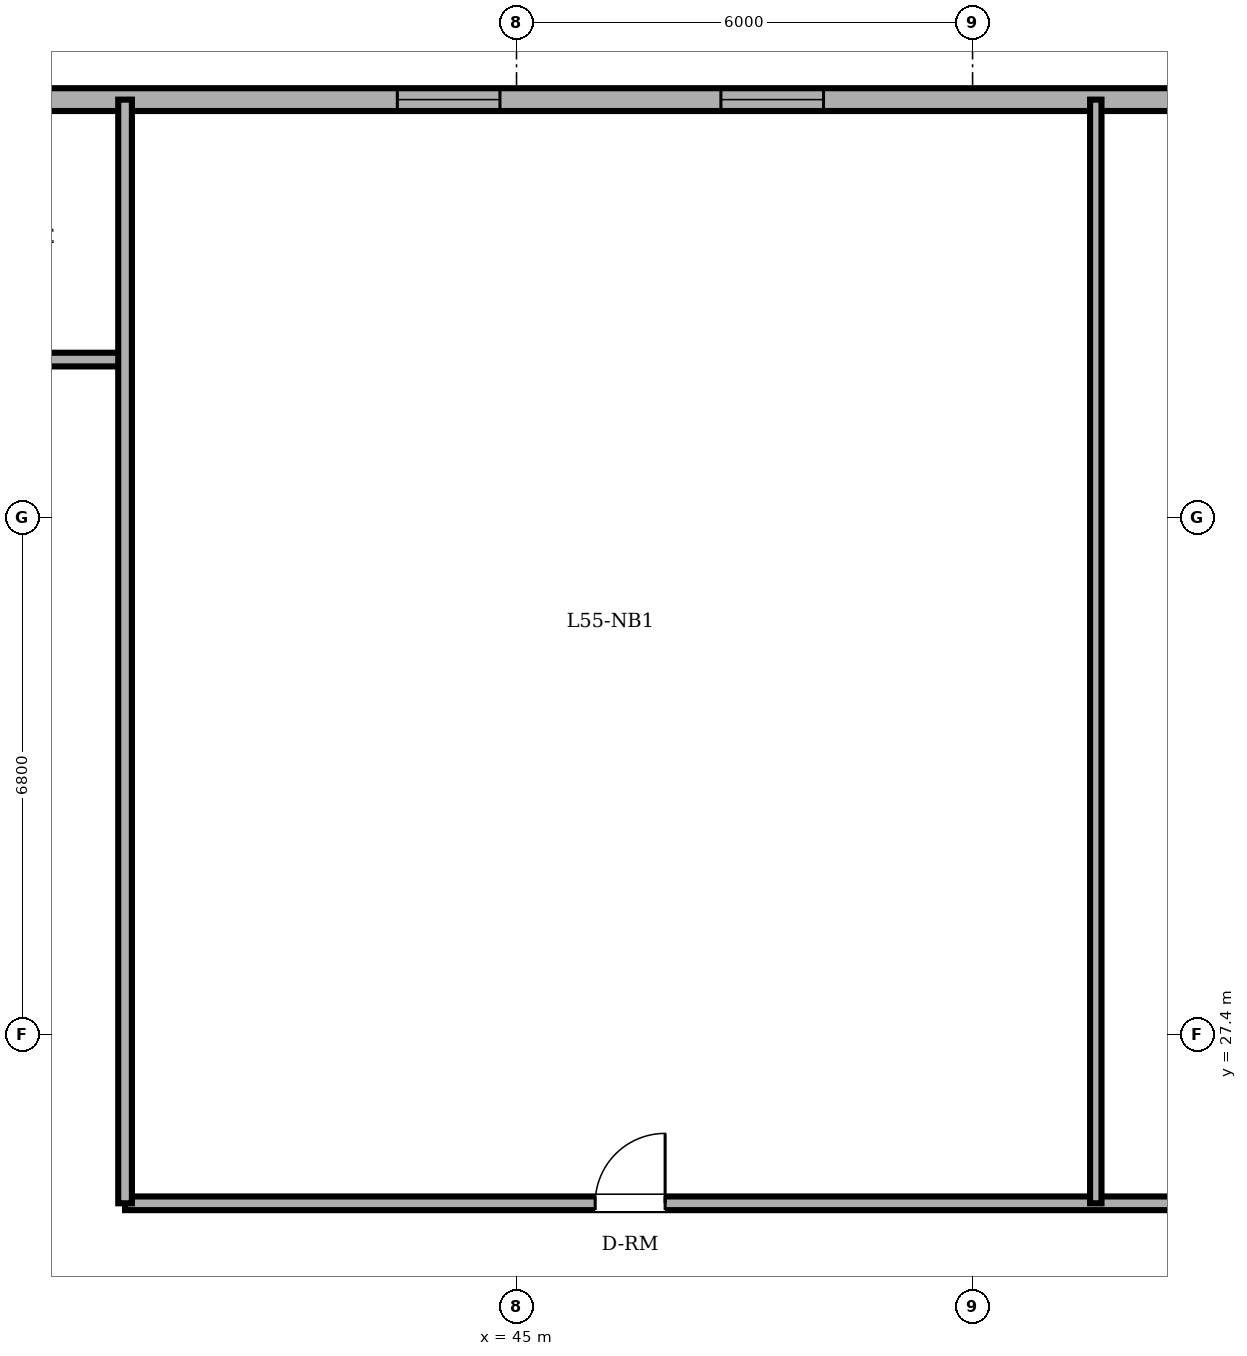
"""IFC4 building model, lengths in metres.
Left out: names, types, materials, properties, quantities, classifications, styles, units other than length and angle.
Written with IfcOpenShell. Run it as: python <this file> out.ifc"""

import sys

from ifc_helpers import new_model, si_unit, direction, frame, frame_2d, origin, place, context, subcontext, project, spatial, rectangle, extrude, element, fill, save


model = new_model("IFC4")
c1 = context("Model", 3, precision=1e-05, world=origin(), true_north=direction((0.0, 1.0)))
c2 = subcontext(c1, "Body", "Model", "MODEL_VIEW")
j1 = project(units=[si_unit("LENGTHUNIT", "METRE"), si_unit("PLANEANGLEUNIT", "RADIAN")], contexts=[c1])
p1 = place(None, origin())
s1 = spatial("IfcSite", under=j1, at=p1, CompositionType="ELEMENT")
p2 = place(p1, origin())
s2 = spatial("IfcBuilding", under=s1, at=p2, CompositionType="ELEMENT")
p3 = place(p2, frame((0.0, 0.0, 212.1)))
s3 = spatial("IfcBuildingStorey", under=s2, at=p3, CompositionType="ELEMENT", Elevation=212.1)
p4 = place(p3, frame((54.885, 39.7, 0.0), z_axis=(0.0, 0.0, 1.0), x_axis=(-1.0, 0.0, 0.0)))
e1 = element("IfcWall", 1, at=p4, inside=s3, PredefinedType="SOLIDWALL", context=c2, shape_type="SweptSolid", body=[
    extrude(rectangle(XDim=32.485, YDim=0.3, at=frame_2d((16.243, 0.0))), origin(), (0.0, 0.0, 1.0), 3.4),
])
p5 = place(p4, frame((19.21, 0.0, 0.0)))
e2 = element("IfcOpeningElement", 2, at=p5, cuts=e1, PredefinedType="OPENING", context=c2, shape_type="SweptSolid", body=[
    extrude(rectangle(XDim=0.95, YDim=2.2, at=frame_2d((0.475, 1.1))), frame((0.0, 0.16, 0.0), z_axis=(0.0, -1.0, 0.0), x_axis=(1.0, 0.0, 0.0)), (0.0, 0.0, 1.0), 0.32),
])
p6 = place(p4, frame((5.846, 0.0, 0.85)))
e3 = element("IfcOpeningElement", 3, at=p6, cuts=e1, PredefinedType="OPENING", context=c2, shape_type="SweptSolid", body=[
    extrude(rectangle(XDim=1.35, YDim=1.55, at=frame_2d((0.675, 0.775))), frame((0.0, 0.16, 0.0), z_axis=(0.0, -1.0, 0.0), x_axis=(1.0, 0.0, 0.0)), (0.0, 0.0, 1.0), 0.32),
])
p7 = place(p4, frame((10.103, 0.0, 0.85)))
e4 = element("IfcOpeningElement", 4, at=p7, cuts=e1, PredefinedType="OPENING", context=c2, shape_type="SweptSolid", body=[
    extrude(rectangle(XDim=1.35, YDim=1.55, at=frame_2d((0.675, 0.775))), frame((0.0, 0.16, 0.0), z_axis=(0.0, -1.0, 0.0), x_axis=(1.0, 0.0, 0.0)), (0.0, 0.0, 1.0), 0.32),
])
p8 = place(p4, frame((16.577, 0.0, 0.85)))
e5 = element("IfcOpeningElement", 5, at=p8, cuts=e1, PredefinedType="OPENING", context=c2, shape_type="SweptSolid", body=[
    extrude(rectangle(XDim=1.35, YDim=1.55, at=frame_2d((0.675, 0.775))), frame((0.0, 0.16, 0.0), z_axis=(0.0, -1.0, 0.0), x_axis=(1.0, 0.0, 0.0)), (0.0, 0.0, 1.0), 0.32),
])
p9 = place(p4, frame((22.91, 0.0, 0.85)))
e6 = element("IfcOpeningElement", 6, at=p9, cuts=e1, PredefinedType="OPENING", context=c2, shape_type="SweptSolid", body=[
    extrude(rectangle(XDim=1.35, YDim=1.55, at=frame_2d((0.675, 0.775))), frame((0.0, 0.16, 0.0), z_axis=(0.0, -1.0, 0.0), x_axis=(1.0, 0.0, 0.0)), (0.0, 0.0, 1.0), 0.32),
])
p10 = place(p4, frame((26.51, 0.0, 0.85)))
e7 = element("IfcOpeningElement", 7, at=p10, cuts=e1, PredefinedType="OPENING", context=c2, shape_type="SweptSolid", body=[
    extrude(rectangle(XDim=1.35, YDim=1.55, at=frame_2d((0.675, 0.775))), frame((0.0, 0.16, 0.0), z_axis=(0.0, -1.0, 0.0), x_axis=(1.0, 0.0, 0.0)), (0.0, 0.0, 1.0), 0.32),
])
p11 = place(p4, frame((29.835, 0.0, 0.85)))
e8 = element("IfcOpeningElement", 8, at=p11, cuts=e1, PredefinedType="OPENING", context=c2, shape_type="SweptSolid", body=[
    extrude(rectangle(XDim=1.35, YDim=1.55, at=frame_2d((0.675, 0.775))), frame((0.0, 0.16, 0.0), z_axis=(0.0, -1.0, 0.0), x_axis=(1.0, 0.0, 0.0)), (0.0, 0.0, 1.0), 0.32),
])
p12 = place(p3, frame((39.85, 25.18, 0.0), z_axis=(0.0, 0.0, 1.0), x_axis=(1.0, 0.0, 0.0)))
e9 = element("IfcWall", 9, at=p12, inside=s3, PredefinedType="PARTITIONING", context=c2, shape_type="SweptSolid", body=[
    extrude(rectangle(XDim=28.75, YDim=0.18, at=frame_2d((14.375, 0.0))), origin(), (0.0, 0.0, 1.0), 3.4),
])
p13 = place(p12, frame((6.185, 0.0, 0.0)))
e10 = element("IfcOpeningElement", 10, at=p13, cuts=e9, PredefinedType="OPENING", context=c2, shape_type="SweptSolid", body=[
    extrude(rectangle(XDim=0.92, YDim=2.1, at=frame_2d((0.46, 1.05))), frame((0.0, 0.1, 0.0), z_axis=(0.0, -1.0, 0.0), x_axis=(1.0, 0.0, 0.0)), (0.0, 0.0, 1.0), 0.2),
])
p14 = place(p12, frame((15.601, 0.0, 0.0)))
e11 = element("IfcOpeningElement", 11, at=p14, cuts=e9, PredefinedType="OPENING", context=c2, shape_type="SweptSolid", body=[
    extrude(rectangle(XDim=0.92, YDim=2.1, at=frame_2d((0.46, 1.05))), frame((0.0, 0.1, 0.0), z_axis=(0.0, -1.0, 0.0), x_axis=(1.0, 0.0, 0.0)), (0.0, 0.0, 1.0), 0.2),
])
p15 = place(p12, frame((21.15, 0.0, 0.0)))
e12 = element("IfcOpeningElement", 12, at=p15, cuts=e9, PredefinedType="OPENING", context=c2, shape_type="SweptSolid", body=[
    extrude(rectangle(XDim=1.0, YDim=2.15, at=frame_2d((0.5, 1.075))), frame((0.0, 0.1, 0.0), z_axis=(0.0, -1.0, 0.0), x_axis=(1.0, 0.0, 0.0)), (0.0, 0.0, 1.0), 0.2),
])
p16 = place(p3, frame((17.677, 36.28, 0.0), z_axis=(0.0, 0.0, 1.0), x_axis=(1.0, 0.0, 0.0)))
e13 = element("IfcWall", 13, at=p16, inside=s3, PredefinedType="PARTITIONING", context=c2, shape_type="SweptSolid", body=[
    extrude(rectangle(XDim=22.173, YDim=0.18, at=frame_2d((11.086, 0.0))), origin(), (0.0, 0.0, 1.0), 3.4),
])
p17 = place(p16, frame((9.573, 0.0, 0.0)))
e14 = element("IfcOpeningElement", 14, at=p17, cuts=e13, PredefinedType="OPENING", context=c2, shape_type="SweptSolid", body=[
    extrude(rectangle(XDim=0.9, YDim=2.1, at=frame_2d((0.45, 1.05))), frame((0.0, 0.1, 0.0), z_axis=(0.0, -1.0, 0.0), x_axis=(1.0, 0.0, 0.0)), (0.0, 0.0, 1.0), 0.2),
])
p18 = place(p16, frame((13.193, 0.0, 0.0)))
e15 = element("IfcOpeningElement", 15, at=p18, cuts=e13, PredefinedType="OPENING", context=c2, shape_type="SweptSolid", body=[
    extrude(rectangle(XDim=0.86, YDim=2.1, at=frame_2d((0.43, 1.05))), frame((0.0, 0.1, 0.0), z_axis=(0.0, -1.0, 0.0), x_axis=(1.0, 0.0, 0.0)), (0.0, 0.0, 1.0), 0.2),
])
p19 = place(p16, frame((4.063, 0.0, 0.0)))
e16 = element("IfcOpeningElement", 16, at=p19, cuts=e13, PredefinedType="OPENING", context=c2, shape_type="SweptSolid", body=[
    extrude(rectangle(XDim=0.92, YDim=2.1, at=frame_2d((0.46, 1.05))), frame((0.0, 0.1, 0.0), z_axis=(0.0, -1.0, 0.0), x_axis=(1.0, 0.0, 0.0)), (0.0, 0.0, 1.0), 0.2),
])
p20 = place(p16, frame((18.128, 0.0, 0.0)))
e17 = element("IfcOpeningElement", 17, at=p20, cuts=e13, PredefinedType="OPENING", context=c2, shape_type="SweptSolid", body=[
    extrude(rectangle(XDim=0.92, YDim=2.1, at=frame_2d((0.46, 1.05))), frame((0.0, 0.1, 0.0), z_axis=(0.0, -1.0, 0.0), x_axis=(1.0, 0.0, 0.0)), (0.0, 0.0, 1.0), 0.2),
])
p21 = place(p3, frame((39.85, 25.18, 0.0), z_axis=(0.0, 0.0, 1.0), x_axis=(0.0, 1.0, 0.0)))
e18 = element("IfcWall", 18, at=p21, inside=s3, PredefinedType="PARTITIONING", context=c2, shape_type="SweptSolid", body=[
    extrude(rectangle(XDim=14.52, YDim=0.18, at=frame_2d((7.26, 0.0))), origin(), (0.0, 0.0, 1.0), 3.4),
])
p22 = place(p3, frame((52.621, 25.18, 0.0), z_axis=(0.0, 0.0, 1.0), x_axis=(0.0, 1.0, 0.0)))
e19 = element("IfcWall", 19, at=p22, inside=s3, PredefinedType="PARTITIONING", context=c2, shape_type="SweptSolid", body=[
    extrude(rectangle(XDim=14.52, YDim=0.15, at=frame_2d((7.26, 0.0))), origin(), (0.0, 0.0, 1.0), 3.4),
])
p23 = place(p6, origin())
e20 = element("IfcWindow", 20, at=p23, inside=s3, PartitioningType="SINGLE_PANEL", PredefinedType="WINDOW", context=c2, shape_type="SweptSolid", body=[
    extrude(rectangle(XDim=1.35, YDim=1.55, at=frame_2d((0.675, 0.775))), frame((0.0, 0.03, 0.0), z_axis=(0.0, -1.0, 0.0), x_axis=(1.0, 0.0, 0.0)), (0.0, 0.0, 1.0), 0.06),
])
fill(e3, e20)
p24 = place(p7, origin())
e21 = element("IfcWindow", 21, at=p24, inside=s3, PartitioningType="SINGLE_PANEL", PredefinedType="WINDOW", context=c2, shape_type="SweptSolid", body=[
    extrude(rectangle(XDim=1.35, YDim=1.55, at=frame_2d((0.675, 0.775))), frame((0.0, 0.03, 0.0), z_axis=(0.0, -1.0, 0.0), x_axis=(1.0, 0.0, 0.0)), (0.0, 0.0, 1.0), 0.06),
])
fill(e4, e21)
p25 = place(p13, origin())
e22 = element("IfcDoor", 22, at=p25, inside=s3, OperationType="SINGLE_SWING_RIGHT", PredefinedType="DOOR", context=c2, shape_type="SweptSolid", body=[
    extrude(rectangle(XDim=0.92, YDim=2.1, at=frame_2d((0.46, 1.05))), frame((0.0, 0.025, 0.0), z_axis=(0.0, -1.0, 0.0), x_axis=(1.0, 0.0, 0.0)), (0.0, 0.0, 1.0), 0.05),
])
fill(e10, e22)
save(model, sys.argv[1])
